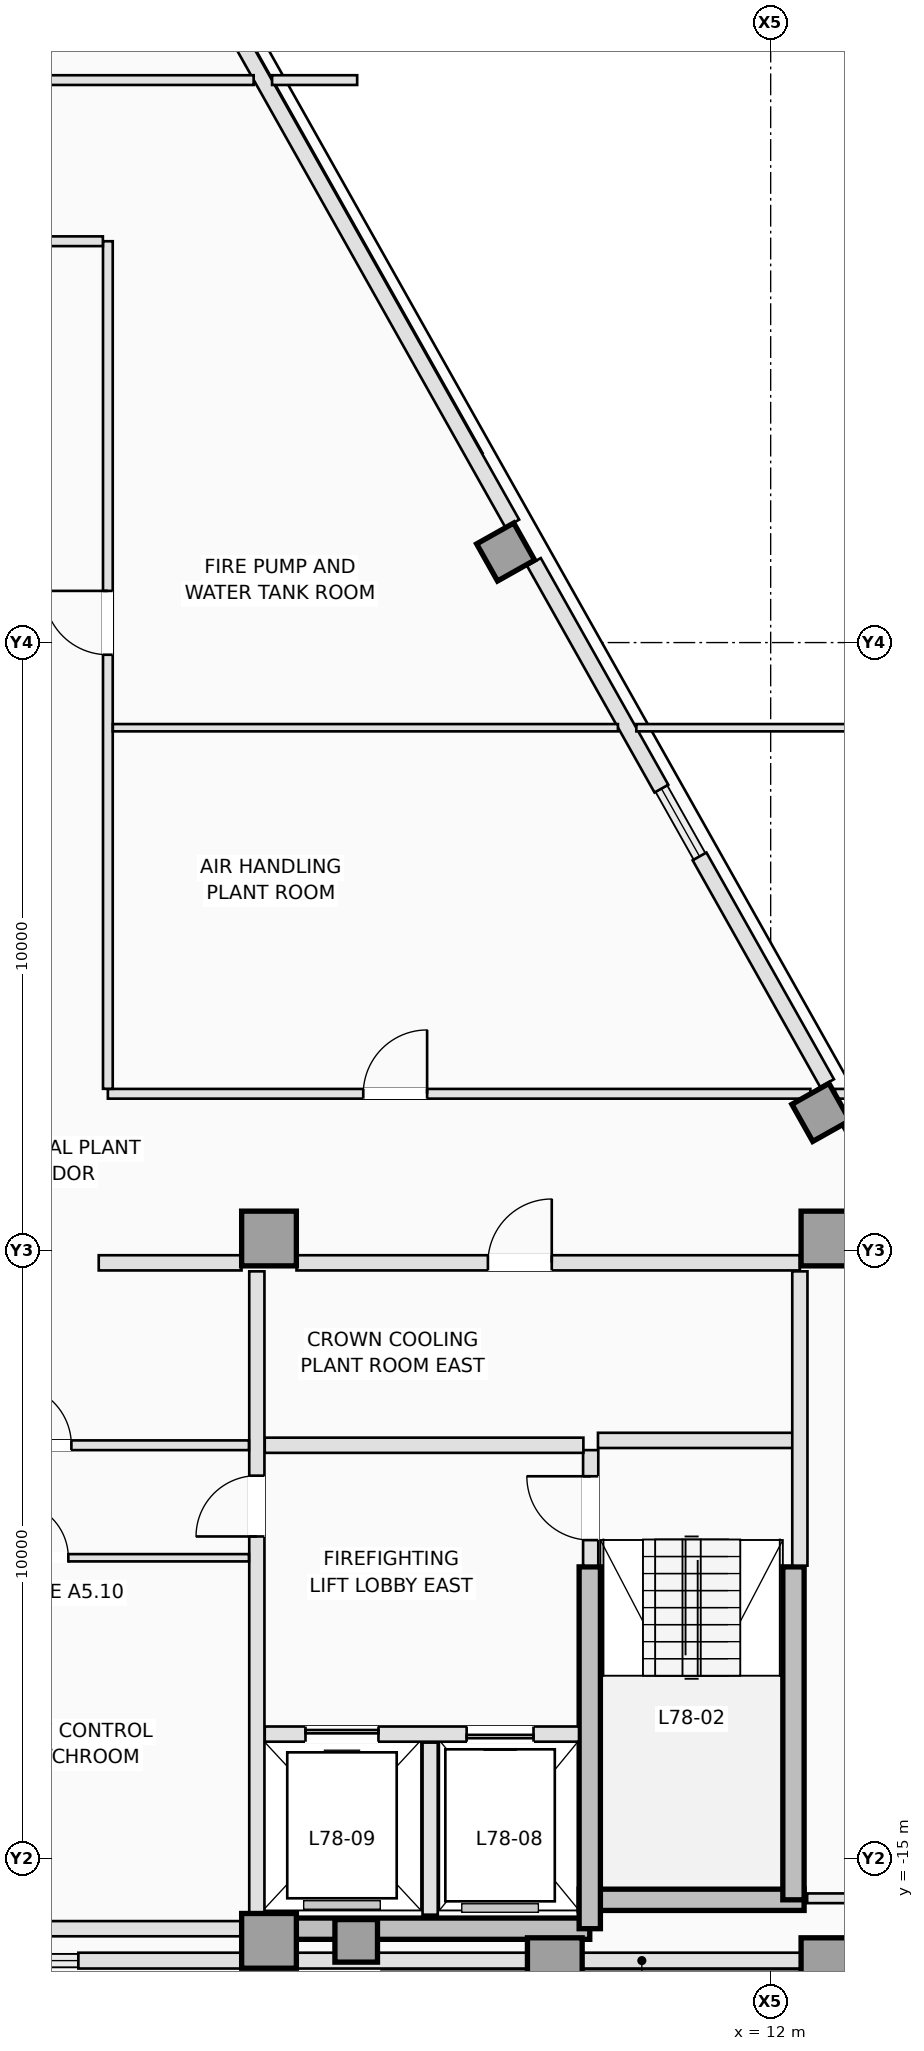
"""IFC4 building model, lengths in metres.
Left out: names, types, materials, properties, quantities, classifications, styles, units other than length and angle.
Written with IfcOpenShell. Run it as: python <this file> out.ifc"""

import sys

from ifc_helpers import new_model, si_unit, direction, frame, frame_2d, origin, origin_2d, place, context, subcontext, project, spatial, rectangle, extrude, element, fill, save


model = new_model("IFC4")
c1 = context("Model", 3, precision=1e-05, world=origin(), true_north=direction((0.0, 1.0)))
c2 = subcontext(c1, "Body", "Model", "MODEL_VIEW")
j1 = project(units=[si_unit("LENGTHUNIT", "METRE"), si_unit("PLANEANGLEUNIT", "RADIAN")], contexts=[c1])
p1 = place(None, origin())
s1 = spatial("IfcSite", under=j1, at=p1, CompositionType="ELEMENT")
p2 = place(p1, origin())
s2 = spatial("IfcBuilding", under=s1, at=p2, CompositionType="ELEMENT")
p3 = place(p2, frame((0.0, 0.0, 280.5)))
s3 = spatial("IfcBuildingStorey", under=s2, at=p3, CompositionType="ELEMENT", Elevation=280.5)
p4 = place(p3, frame((3.75, -16.15, 0.0), z_axis=(0.0, 0.0, 1.0), x_axis=(1.0, 0.0, 0.0)))
e1 = element("IfcWall", 1, at=p4, inside=s3, PredefinedType="SHEAR", context=c2, shape_type="SweptSolid", body=[
    extrude(rectangle(XDim=5.275, YDim=0.35, at=frame_2d((2.637, 0.0))), origin(), (0.0, 0.0, 1.0), 3.2),
])
p5 = place(p3, frame((8.85, -15.675, 0.0), z_axis=(0.0, 0.0, 1.0), x_axis=(1.0, 0.0, 0.0)))
e2 = element("IfcWall", 2, at=p5, inside=s3, PredefinedType="SHEAR", context=c2, shape_type="SweptSolid", body=[
    extrude(rectangle(XDim=3.7, YDim=0.35, at=frame_2d((1.85, 0.0))), origin(), (0.0, 0.0, 1.0), 3.2),
])
p6 = place(p3, frame((12.375, -15.675, 0.0), z_axis=(0.0, 0.0, 1.0), x_axis=(0.0, 1.0, 0.0)))
e3 = element("IfcWall", 3, at=p6, inside=s3, PredefinedType="SHEAR", context=c2, shape_type="SweptSolid", body=[
    extrude(rectangle(XDim=5.475, YDim=0.35, at=frame_2d((2.738, 0.0))), origin(), (0.0, 0.0, 1.0), 3.2),
])
p7 = place(p3, frame((9.025, -16.15, 0.0), z_axis=(0.0, 0.0, 1.0), x_axis=(0.0, 1.0, 0.0)))
e4 = element("IfcWall", 4, at=p7, inside=s3, PredefinedType="SHEAR", context=c2, shape_type="SweptSolid", body=[
    extrude(rectangle(XDim=5.95, YDim=0.35, at=frame_2d((2.975, 0.0))), origin(), (0.0, 0.0, 1.0), 3.2),
])
for number, where, z_axis, x_axis in (
    (5, (3.75, -16.35, 0.0), (0.0, 0.0, 1.0), (1.0, 0.0, 0.0)),
    (6, (8.45, -16.75, 0.0), (0.0, 0.0, 1.0), (1.0, 0.0, 0.0)),
    (7, (12.95, -16.75, 0.0), (0.0, 0.0, 1.0), (1.0, 0.0, 0.0)),
    (8, (3.75, -4.8, 0.0), (0.0, 0.0, 1.0), (1.0, 0.0, 0.0)),
    (9, (12.95, -4.8, 0.0), (0.0, 0.0, 1.0), (1.0, 0.0, 0.0)),
):
    element("IfcColumn", number, at=place(p3, frame(where, z_axis=z_axis, x_axis=x_axis)), inside=s3, PredefinedType="COLUMN", context=c2, shape_type="SweptSolid", body=[
        extrude(rectangle(XDim=0.9, YDim=0.9, at=origin_2d()), origin(), (0.0, 0.0, 1.0), 3.2),
    ])
for number, where, z_axis, x_axis in (
    (10, (5.184, -16.35, 0.0), (0.0, 0.0, 1.0), (0.0, 1.0, 0.0)),
    (11, (12.825, -2.727, 0.0), (0.0, 0.0, 1.0), (0.872, 0.49, 0.0)),
    (12, (7.642, 6.489, 0.0), (0.0, 0.0, 1.0), (0.872, 0.49, 0.0)),
):
    element("IfcColumn", number, at=place(p3, frame(where, z_axis=z_axis, x_axis=x_axis)), inside=s3, PredefinedType="COLUMN", context=c2, shape_type="SweptSolid", body=[
        extrude(rectangle(XDim=0.7, YDim=0.7, at=origin_2d()), origin(), (0.0, 0.0, 1.0), 3.2),
    ])
p8 = place(p3, frame((15.542, -16.675, 0.0), z_axis=(0.0, 0.0, 1.0), x_axis=(-1.0, 0.0, 0.0)))
e13 = element("IfcWall", 13, at=p8, inside=s3, PredefinedType="STANDARD", context=c2, shape_type="SweptSolid", body=[
    extrude(rectangle(XDim=11.323, YDim=0.26, at=frame_2d((5.661, 0.0))), origin(), (0.0, 0.0, 1.0), 2.234),
])
p9 = place(p3, frame((3.28, -16.675, 0.0), z_axis=(0.0, 0.0, 1.0), x_axis=(-1.0, 0.0, 0.0)))
e14 = element("IfcWall", 14, at=p9, inside=s3, PredefinedType="STANDARD", context=c2, shape_type="SweptSolid", body=[
    extrude(rectangle(XDim=2.665, YDim=0.26, at=frame_2d((1.333, 0.0))), origin(), (0.0, 0.0, 1.0), 2.95),
])
p10 = place(p3, frame((2.742, 15.863, 0.0), z_axis=(0.0, 0.0, 1.0), x_axis=(0.490260105081, -0.871576175309, 0.0)))
e15 = element("IfcWall", 15, at=p10, inside=s3, PredefinedType="STANDARD", context=c2, shape_type="SweptSolid", body=[
    extrude(rectangle(XDim=10.217, YDim=0.26, at=frame_2d((5.108, 0.0))), origin(), (0.0, 0.0, 1.0), 2.95),
])
p11 = place(p3, frame((13.283, -2.877, 0.0), z_axis=(0.0, 0.0, 1.0), x_axis=(0.490270316201, -0.871570431492, 0.0)))
e16 = element("IfcWall", 16, at=p11, inside=s3, PredefinedType="STANDARD", context=c2, shape_type="SweptSolid", body=[
    extrude(rectangle(XDim=10.216, YDim=0.26, at=frame_2d((5.108, 0.0))), origin(), (0.0, 0.0, 1.0), 2.95),
])
p12 = place(p3, frame((8.106, 6.326, 0.0), z_axis=(0.0, 0.0, 1.0), x_axis=(0.490244979871, -0.871584683041, 0.0)))
e17 = element("IfcWall", 17, at=p12, inside=s3, PredefinedType="STANDARD", context=c2, shape_type="SweptSolid", body=[
    extrude(rectangle(XDim=4.277, YDim=0.26, at=frame_2d((2.139, 0.0))), origin(), (0.0, 0.0, 1.0), 2.95),
])
p13 = place(p3, frame((10.83, 1.483, 0.0), z_axis=(0.0, 0.0, 1.0), x_axis=(0.490220591932, -0.871598400209, 0.0)))
e18 = element("IfcWall", 18, at=p13, inside=s3, PredefinedType="STANDARD", context=c2, shape_type="SweptSolid", body=[
    extrude(rectangle(XDim=4.278, YDim=0.26, at=frame_2d((2.139, 0.0))), origin(), (0.0, 0.0, 1.0), 2.95),
])
p14 = place(p3, frame((9.04, -10.18, 0.0), z_axis=(0.0, 0.0, 1.0), x_axis=(0.0, 1.0, 0.0)))
e19 = element("IfcWall", 19, at=p14, inside=s3, PredefinedType="PARTITIONING", context=c2, shape_type="SweptSolid", body=[
    extrude(rectangle(XDim=1.9, YDim=0.25, at=frame_2d((0.95, 0.0))), origin(), (0.0, 0.0, 1.0), 2.95),
])
p15 = place(p14, frame((0.42, 0.0, 0.0)))
e20 = element("IfcOpeningElement", 20, at=p15, cuts=e19, PredefinedType="OPENING", context=c2, shape_type="SweptSolid", body=[
    extrude(rectangle(XDim=1.05, YDim=2.15, at=frame_2d((0.525, 1.075))), frame((0.0, 0.135, 0.0), z_axis=(0.0, -1.0, 0.0), x_axis=(1.0, 0.0, 0.0)), (0.0, 0.0, 1.0), 0.27),
])
p16 = place(p3, frame((9.16, -8.12, 0.0), z_axis=(0.0, 0.0, 1.0), x_axis=(1.0, 0.0, 0.0)))
e21 = element("IfcWall", 21, at=p16, inside=s3, PredefinedType="PARTITIONING", context=c2, shape_type="SweptSolid", body=[
    extrude(rectangle(XDim=3.22, YDim=0.25, at=frame_2d((1.61, 0.0))), origin(), (0.0, 0.0, 1.0), 2.95),
])
p17 = place(p3, frame((12.48, -10.18, 0.0), z_axis=(0.0, 0.0, 1.0), x_axis=(0.0, 1.0, 0.0)))
e22 = element("IfcWall", 22, at=p17, inside=s3, PredefinedType="PARTITIONING", context=c2, shape_type="SweptSolid", body=[
    extrude(rectangle(XDim=4.84, YDim=0.25, at=frame_2d((2.42, 0.0))), origin(), (0.0, 0.0, 1.0), 2.95),
])
p18 = place(p3, frame((3.68, -12.95, 0.0), z_axis=(0.0, 0.0, 1.0), x_axis=(1.0, 0.0, 0.0)))
e23 = element("IfcWall", 23, at=p18, inside=s3, PredefinedType="PARTITIONING", context=c2, shape_type="SweptSolid", body=[
    extrude(rectangle(XDim=5.168, YDim=0.25, at=frame_2d((2.584, 0.0))), origin(), (0.0, 0.0, 1.0), 2.95),
])
p19 = place(p18, frame((3.32, 0.0, 0.0)))
e24 = element("IfcOpeningElement", 24, at=p19, cuts=e23, PredefinedType="OPENING", context=c2, shape_type="SweptSolid", body=[
    extrude(rectangle(XDim=1.1, YDim=2.15, at=frame_2d((0.55, 1.075))), frame((0.0, 0.135, 0.0), z_axis=(0.0, -1.0, 0.0), x_axis=(1.0, 0.0, 0.0)), (0.0, 0.0, 1.0), 0.27),
])
p20 = place(p18, frame((0.67, 0.0, 0.0)))
e25 = element("IfcOpeningElement", 25, at=p20, cuts=e23, PredefinedType="OPENING", context=c2, shape_type="SweptSolid", body=[
    extrude(rectangle(XDim=1.2, YDim=2.15, at=frame_2d((0.6, 1.075))), frame((0.0, 0.135, 0.0), z_axis=(0.0, -1.0, 0.0), x_axis=(1.0, 0.0, 0.0)), (0.0, 0.0, 1.0), 0.27),
])
p21 = place(p3, frame((6.4, -15.92, 0.0), z_axis=(0.0, 0.0, 1.0), x_axis=(0.0, 1.0, 0.0)))
e26 = element("IfcWall", 26, at=p21, inside=s3, PredefinedType="PARTITIONING", context=c2, shape_type="SweptSolid", body=[
    extrude(rectangle(XDim=2.83, YDim=0.25, at=frame_2d((1.415, 0.0))), origin(), (0.0, 0.0, 1.0), 2.95),
])
p22 = place(p3, frame((3.68, -8.2, 0.0), z_axis=(0.0, 0.0, 1.0), x_axis=(1.0, 0.0, 0.0)))
e27 = element("IfcWall", 27, at=p22, inside=s3, PredefinedType="PARTITIONING", context=c2, shape_type="SweptSolid", body=[
    extrude(rectangle(XDim=5.24, YDim=0.25, at=frame_2d((2.62, 0.0))), origin(), (0.0, 0.0, 1.0), 2.95),
])
p23 = place(p3, frame((3.55, -15.898, 0.0), z_axis=(0.0, 0.0, 1.0), x_axis=(0.0, 1.0, 0.0)))
e28 = element("IfcWall", 28, at=p23, inside=s3, PredefinedType="PARTITIONING", context=c2, shape_type="SweptSolid", body=[
    extrude(rectangle(XDim=10.558, YDim=0.25, at=frame_2d((5.279, 0.0))), origin(), (0.0, 0.0, 1.0), 2.95),
])
p24 = place(p23, frame((6.198, 0.0, 0.0)))
e29 = element("IfcOpeningElement", 29, at=p24, cuts=e28, PredefinedType="OPENING", context=c2, shape_type="SweptSolid", body=[
    extrude(rectangle(XDim=1.0, YDim=2.15, at=frame_2d((0.5, 1.075))), frame((0.0, 0.135, 0.0), z_axis=(0.0, -1.0, 0.0), x_axis=(1.0, 0.0, 0.0)), (0.0, 0.0, 1.0), 0.27),
])
p25 = place(p3, frame((4.202, -5.2, 0.0), z_axis=(0.0, 0.0, 1.0), x_axis=(1.0, 0.0, 0.0)))
e30 = element("IfcWall", 30, at=p25, inside=s3, PredefinedType="PARTITIONING", context=c2, shape_type="SweptSolid", body=[
    extrude(rectangle(XDim=8.278, YDim=0.25, at=frame_2d((4.139, 0.0))), origin(), (0.0, 0.0, 1.0), 2.95),
])
p26 = place(p25, frame((3.148, 0.0, 0.0)))
e31 = element("IfcOpeningElement", 31, at=p26, cuts=e30, PredefinedType="OPENING", context=c2, shape_type="SweptSolid", body=[
    extrude(rectangle(XDim=1.05, YDim=2.12, at=frame_2d((0.525, 1.06))), frame((0.0, 0.135, 0.0), z_axis=(0.0, -1.0, 0.0), x_axis=(1.0, 0.0, 0.0)), (0.0, 0.0, 1.0), 0.27),
])
p27 = place(p3, frame((0.95, -5.2, 0.0), z_axis=(0.0, 0.0, 1.0), x_axis=(1.0, 0.0, 0.0)))
e32 = element("IfcWall", 32, at=p27, inside=s3, PredefinedType="PARTITIONING", context=c2, shape_type="SweptSolid", body=[
    extrude(rectangle(XDim=2.348, YDim=0.25, at=frame_2d((1.174, 0.0))), origin(), (0.0, 0.0, 1.0), 2.95),
])
p28 = place(p3, frame((-3.298, -16.15, 0.0), z_axis=(0.0, 0.0, 1.0), x_axis=(1.0, 0.0, 0.0)))
e33 = element("IfcWall", 33, at=p28, inside=s3, PredefinedType="PARTITIONING", context=c2, shape_type="SweptSolid", body=[
    extrude(rectangle(XDim=6.596, YDim=0.25, at=frame_2d((3.298, 0.0))), origin(), (0.0, 0.0, 1.0), 2.544),
])
p29 = place(p3, frame((-3.42, -8.2, 0.0), z_axis=(0.0, 0.0, 1.0), x_axis=(1.0, 0.0, 0.0)))
e34 = element("IfcWall", 34, at=p29, inside=s3, PredefinedType="PARTITIONING", context=c2, shape_type="SweptSolid", body=[
    extrude(rectangle(XDim=6.84, YDim=0.16, at=frame_2d((3.42, 0.0))), origin(), (0.0, 0.0, 1.0), 2.95),
])
p30 = place(p29, frame((2.92, 0.0, 0.0)))
e35 = element("IfcOpeningElement", 35, at=p30, cuts=e34, PredefinedType="OPENING", context=c2, shape_type="SweptSolid", body=[
    extrude(rectangle(XDim=1.0, YDim=2.15, at=frame_2d((0.5, 1.075))), frame((0.0, 0.09, 0.0), z_axis=(0.0, -1.0, 0.0), x_axis=(1.0, 0.0, 0.0)), (0.0, 0.0, 1.0), 0.18),
])
p31 = place(p3, frame((-3.42, -10.05, 0.0), z_axis=(0.0, 0.0, 1.0), x_axis=(1.0, 0.0, 0.0)))
e36 = element("IfcWall", 36, at=p31, inside=s3, PredefinedType="PARTITIONING", context=c2, shape_type="SweptSolid", body=[
    extrude(rectangle(XDim=6.84, YDim=0.12, at=frame_2d((3.42, 0.0))), origin(), (0.0, 0.0, 1.0), 2.95),
])
p32 = place(p31, frame((2.95, 0.0, 0.0)))
e37 = element("IfcOpeningElement", 37, at=p32, cuts=e36, PredefinedType="OPENING", context=c2, shape_type="SweptSolid", body=[
    extrude(rectangle(XDim=0.92, YDim=2.12, at=frame_2d((0.46, 1.06))), frame((0.0, 0.07, 0.0), z_axis=(0.0, -1.0, 0.0), x_axis=(1.0, 0.0, 0.0)), (0.0, 0.0, 1.0), 0.14),
])
p33 = place(p3, frame((-3.498, 14.25, 0.0), z_axis=(0.0, 0.0, 1.0), x_axis=(1.0, 0.0, 0.0)))
e38 = element("IfcWall", 38, at=p33, inside=s3, PredefinedType="PARTITIONING", context=c2, shape_type="SweptSolid", body=[
    extrude(rectangle(XDim=6.995, YDim=0.16, at=frame_2d((3.498, 0.0))), origin(), (0.0, 0.0, 1.0), 2.95),
])
p34 = place(p3, frame((3.8, 14.25, 0.0), z_axis=(0.0, 0.0, 1.0), x_axis=(1.0, 0.0, 0.0)))
e39 = element("IfcWall", 39, at=p34, inside=s3, PredefinedType="PARTITIONING", context=c2, shape_type="SweptSolid", body=[
    extrude(rectangle(XDim=1.4, YDim=0.16, at=frame_2d((0.7, 0.0))), origin(), (0.0, 0.0, 1.0), 2.95),
])
p35 = place(p3, frame((12.6, -15.65, 0.0), z_axis=(0.0, 0.0, 1.0), x_axis=(1.0, 0.0, 0.0)))
e40 = element("IfcWall", 40, at=p35, inside=s3, PredefinedType="PARTITIONING", context=c2, shape_type="SweptSolid", body=[
    extrude(rectangle(XDim=3.143, YDim=0.16, at=frame_2d((1.571, 0.0))), origin(), (0.0, 0.0, 1.0), 2.95),
])
p36 = place(p3, frame((1.1, -2.42, 0.0), z_axis=(0.0, 0.0, 1.0), x_axis=(1.0, 0.0, 0.0)))
e41 = element("IfcWall", 41, at=p36, inside=s3, PredefinedType="PARTITIONING", context=c2, shape_type="SweptSolid", body=[
    extrude(rectangle(XDim=11.553, YDim=0.16, at=frame_2d((5.776, 0.0))), origin(), (0.0, 0.0, 1.0), 2.95),
])
p37 = place(p36, frame((4.2, 0.0, 0.0)))
e42 = element("IfcOpeningElement", 42, at=p37, cuts=e41, PredefinedType="OPENING", context=c2, shape_type="SweptSolid", body=[
    extrude(rectangle(XDim=1.05, YDim=2.12, at=frame_2d((0.525, 1.06))), frame((0.0, 0.09, 0.0), z_axis=(0.0, -1.0, 0.0), x_axis=(1.0, 0.0, 0.0)), (0.0, 0.0, 1.0), 0.18),
])
p38 = place(p3, frame((13.057, -2.42, 0.0), z_axis=(0.0, 0.0, 1.0), x_axis=(1.0, 0.0, 0.0)))
e43 = element("IfcWall", 43, at=p38, inside=s3, PredefinedType="PARTITIONING", context=c2, shape_type="SweptSolid", body=[
    extrude(rectangle(XDim=2.743, YDim=0.16, at=frame_2d((1.372, 0.0))), origin(), (0.0, 0.0, 1.0), 2.95),
])
p39 = place(p3, frame((1.1, -2.338, 0.0), z_axis=(0.0, 0.0, 1.0), x_axis=(0.0, 1.0, 0.0)))
e44 = element("IfcWall", 44, at=p39, inside=s3, PredefinedType="PARTITIONING", context=c2, shape_type="SweptSolid", body=[
    extrude(rectangle(XDim=13.938, YDim=0.16, at=frame_2d((6.969, 0.0))), origin(), (0.0, 0.0, 1.0), 2.95),
])
p40 = place(p39, frame((7.138, 0.0, 0.0)))
e45 = element("IfcOpeningElement", 45, at=p40, cuts=e44, PredefinedType="OPENING", context=c2, shape_type="SweptSolid", body=[
    extrude(rectangle(XDim=1.05, YDim=2.12, at=frame_2d((0.525, 1.06))), frame((0.0, 0.09, 0.0), z_axis=(0.0, -1.0, 0.0), x_axis=(1.0, 0.0, 0.0)), (0.0, 0.0, 1.0), 0.18),
])
p41 = place(p3, frame((-1.018, 11.6, 0.0), z_axis=(0.0, 0.0, 1.0), x_axis=(1.0, 0.0, 0.0)))
e46 = element("IfcWall", 46, at=p41, inside=s3, PredefinedType="PARTITIONING", context=c2, shape_type="SweptSolid", body=[
    extrude(rectangle(XDim=2.036, YDim=0.16, at=frame_2d((1.018, 0.0))), origin(), (0.0, 0.0, 1.0), 2.95),
])
p42 = place(p3, frame((1.182, 3.6, 0.0), z_axis=(0.0, 0.0, 1.0), x_axis=(1.0, 0.0, 0.0)))
e47 = element("IfcWall", 47, at=p42, inside=s3, PredefinedType="PARTITIONING", context=c2, shape_type="SweptSolid", body=[
    extrude(rectangle(XDim=8.306, YDim=0.12, at=frame_2d((4.153, 0.0))), origin(), (0.0, 0.0, 1.0), 2.95),
])
p43 = place(p3, frame((9.791, 3.6, 0.0), z_axis=(0.0, 0.0, 1.0), x_axis=(1.0, 0.0, 0.0)))
e48 = element("IfcWall", 48, at=p43, inside=s3, PredefinedType="PARTITIONING", context=c2, shape_type="SweptSolid", body=[
    extrude(rectangle(XDim=4.409, YDim=0.12, at=frame_2d((2.205, 0.0))), origin(), (0.0, 0.0, 1.0), 2.95),
])
p44 = place(p19, origin())
e49 = element("IfcDoor", 49, at=p44, inside=s3, OperationType="SLIDING_TO_RIGHT", PredefinedType="DOOR", context=c2, shape_type="SweptSolid", body=[
    extrude(rectangle(XDim=1.1, YDim=2.15, at=frame_2d((0.55, 1.075))), frame((0.0, 0.025, 0.0), z_axis=(0.0, -1.0, 0.0), x_axis=(1.0, 0.0, 0.0)), (0.0, 0.0, 1.0), 0.05),
])
fill(e24, e49)
p45 = place(p20, origin())
e50 = element("IfcDoor", 50, at=p45, inside=s3, OperationType="SLIDING_TO_LEFT", PredefinedType="DOOR", context=c2, shape_type="SweptSolid", body=[
    extrude(rectangle(XDim=1.2, YDim=2.15, at=frame_2d((0.6, 1.075))), frame((0.0, 0.025, 0.0), z_axis=(0.0, -1.0, 0.0), x_axis=(1.0, 0.0, 0.0)), (0.0, 0.0, 1.0), 0.05),
])
fill(e25, e50)
p46 = place(p15, origin())
e51 = element("IfcDoor", 51, at=p46, inside=s3, OperationType="SINGLE_SWING_RIGHT", PredefinedType="DOOR", context=c2, shape_type="SweptSolid", body=[
    extrude(rectangle(XDim=1.05, YDim=2.15, at=frame_2d((0.525, 1.075))), frame((0.0, 0.025, 0.0), z_axis=(0.0, -1.0, 0.0), x_axis=(1.0, 0.0, 0.0)), (0.0, 0.0, 1.0), 0.05),
])
fill(e20, e51)
p47 = place(p24, origin())
e52 = element("IfcDoor", 52, at=p47, inside=s3, OperationType="SINGLE_SWING_LEFT", PredefinedType="DOOR", context=c2, shape_type="SweptSolid", body=[
    extrude(rectangle(XDim=1.0, YDim=2.15, at=frame_2d((0.5, 1.075))), frame((0.0, 0.025, 0.0), z_axis=(0.0, -1.0, 0.0), x_axis=(1.0, 0.0, 0.0)), (0.0, 0.0, 1.0), 0.05),
])
fill(e29, e52)
p48 = place(p26, origin())
e53 = element("IfcDoor", 53, at=p48, inside=s3, OperationType="SINGLE_SWING_RIGHT", PredefinedType="DOOR", context=c2, shape_type="SweptSolid", body=[
    extrude(rectangle(XDim=1.05, YDim=2.12, at=frame_2d((0.525, 1.06))), frame((0.0, 0.025, 0.0), z_axis=(0.0, -1.0, 0.0), x_axis=(1.0, 0.0, 0.0)), (0.0, 0.0, 1.0), 0.05),
])
fill(e31, e53)
p49 = place(p30, origin())
e54 = element("IfcDoor", 54, at=p49, inside=s3, OperationType="SINGLE_SWING_LEFT", PredefinedType="DOOR", context=c2, shape_type="SweptSolid", body=[
    extrude(rectangle(XDim=1.0, YDim=2.15, at=frame_2d((0.5, 1.075))), frame((0.0, 0.025, 0.0), z_axis=(0.0, -1.0, 0.0), x_axis=(1.0, 0.0, 0.0)), (0.0, 0.0, 1.0), 0.05),
])
fill(e35, e54)
p50 = place(p32, origin())
e55 = element("IfcDoor", 55, at=p50, inside=s3, OperationType="SINGLE_SWING_LEFT", PredefinedType="DOOR", context=c2, shape_type="SweptSolid", body=[
    extrude(rectangle(XDim=0.92, YDim=2.12, at=frame_2d((0.46, 1.06))), frame((0.0, 0.025, 0.0), z_axis=(0.0, -1.0, 0.0), x_axis=(1.0, 0.0, 0.0)), (0.0, 0.0, 1.0), 0.05),
])
fill(e37, e55)
p51 = place(p37, origin())
e56 = element("IfcDoor", 56, at=p51, inside=s3, OperationType="SINGLE_SWING_RIGHT", PredefinedType="DOOR", context=c2, shape_type="SweptSolid", body=[
    extrude(rectangle(XDim=1.05, YDim=2.12, at=frame_2d((0.525, 1.06))), frame((0.0, 0.025, 0.0), z_axis=(0.0, -1.0, 0.0), x_axis=(1.0, 0.0, 0.0)), (0.0, 0.0, 1.0), 0.05),
])
fill(e42, e56)
p52 = place(p40, origin())
e57 = element("IfcDoor", 57, at=p52, inside=s3, OperationType="SINGLE_SWING_RIGHT", PredefinedType="DOOR", context=c2, shape_type="SweptSolid", body=[
    extrude(rectangle(XDim=1.05, YDim=2.12, at=frame_2d((0.525, 1.06))), frame((0.0, 0.025, 0.0), z_axis=(0.0, -1.0, 0.0), x_axis=(1.0, 0.0, 0.0)), (0.0, 0.0, 1.0), 0.05),
])
fill(e45, e57)
save(model, sys.argv[1])
